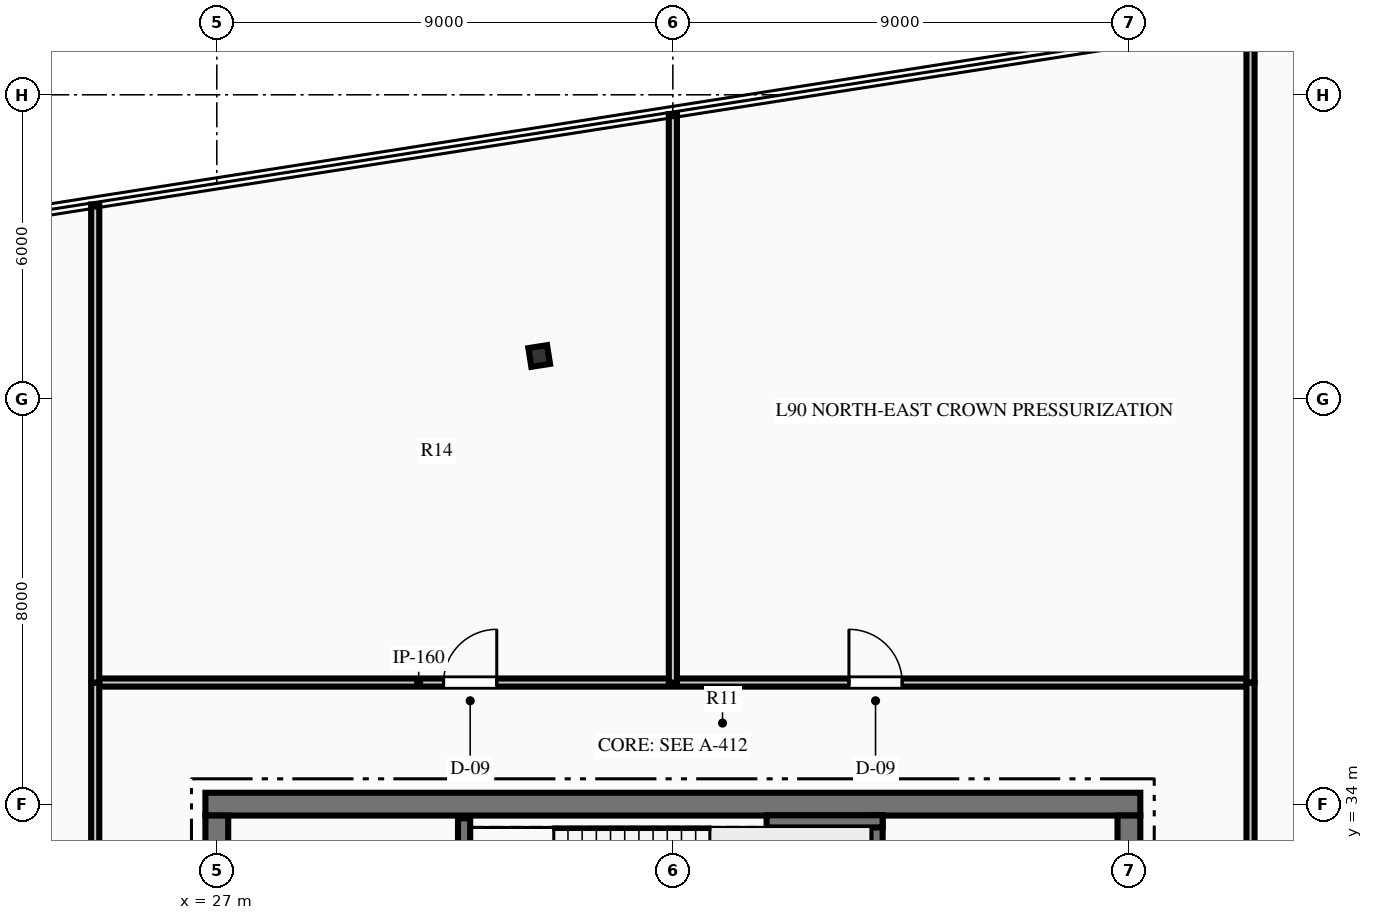
"""IFC4 building model, lengths in metres.
Left out: names, types, materials, properties, quantities, classifications, styles, units other than length and angle.
Written with IfcOpenShell. Run it as: python <this file> out.ifc"""

import sys

from ifc_helpers import new_model, si_unit, direction, frame, frame_2d, origin, origin_2d, place, context, subcontext, project, spatial, rectangle, i_section, extrude, element, fill, save


model = new_model("IFC4")
c1 = context("Model", 3, precision=1e-05, world=origin(), true_north=direction((0.0, 1.0)))
c2 = subcontext(c1, "Body", "Model", "MODEL_VIEW")
j1 = project(units=[si_unit("LENGTHUNIT", "METRE"), si_unit("PLANEANGLEUNIT", "RADIAN")], contexts=[c1])
p1 = place(None, origin())
s1 = spatial("IfcSite", under=j1, at=p1, CompositionType="ELEMENT")
p2 = place(p1, origin())
s2 = spatial("IfcBuilding", under=s1, at=p2, CompositionType="ELEMENT")
p3 = place(p2, frame((0.0, 0.0, 356.4)))
s3 = spatial("IfcBuildingStorey", under=s2, at=p3, CompositionType="ELEMENT", Elevation=356.4)
p4 = place(p3, frame((26.775, 34.0, 0.0), z_axis=(0.0, 0.0, 1.0), x_axis=(1.0, 0.0, 0.0)))
e1 = element("IfcWall", 1, at=p4, inside=s3, PredefinedType="SHEAR", context=c2, shape_type="SweptSolid", body=[
    extrude(rectangle(XDim=18.45, YDim=0.45, at=frame_2d((9.225, 0.0))), origin(), (0.0, 0.0, 1.0), 4.2),
])
p5 = place(p3, frame((27.0, 18.225, 0.0), z_axis=(0.0, 0.0, 1.0), x_axis=(0.0, 1.0, 0.0)))
e2 = element("IfcWall", 2, at=p5, inside=s3, PredefinedType="SHEAR", context=c2, shape_type="SweptSolid", body=[
    extrude(rectangle(XDim=15.55, YDim=0.45, at=frame_2d((7.775, 0.0))), origin(), (0.0, 0.0, 1.0), 4.2),
])
p6 = place(p5, frame((10.015, 0.0, 0.0)))
e3 = element("IfcOpeningElement", 3, at=p6, cuts=e2, PredefinedType="OPENING", context=c2, shape_type="SweptSolid", body=[
    extrude(rectangle(XDim=1.4, YDim=2.2, at=frame_2d((0.7, 1.1))), frame((0.0, 0.235, 0.0), z_axis=(0.0, -1.0, 0.0), x_axis=(1.0, 0.0, 0.0)), (0.0, 0.0, 1.0), 0.47),
])
p7 = place(p3, frame((45.0, 18.225, 0.0), z_axis=(0.0, 0.0, 1.0), x_axis=(0.0, 1.0, 0.0)))
e4 = element("IfcWall", 4, at=p7, inside=s3, PredefinedType="SHEAR", context=c2, shape_type="SweptSolid", body=[
    extrude(rectangle(XDim=15.55, YDim=0.45, at=frame_2d((7.775, 0.0))), origin(), (0.0, 0.0, 1.0), 4.2),
])
p8 = place(p7, frame((10.015, 0.0, 0.0)))
e5 = element("IfcOpeningElement", 5, at=p8, cuts=e4, PredefinedType="OPENING", context=c2, shape_type="SweptSolid", body=[
    extrude(rectangle(XDim=1.4, YDim=2.2, at=frame_2d((0.7, 1.1))), frame((0.0, 0.235, 0.0), z_axis=(0.0, -1.0, 0.0), x_axis=(1.0, 0.0, 0.0)), (0.0, 0.0, 1.0), 0.47),
])
p9 = place(p3, frame((31.88, 29.93, 0.0), z_axis=(0.0, 0.0, 1.0), x_axis=(0.0, 1.0, 0.0)))
e6 = element("IfcWall", 6, at=p9, inside=s3, PredefinedType="SHEAR", context=c2, shape_type="SweptSolid", body=[
    extrude(rectangle(XDim=3.79, YDim=0.24, at=frame_2d((1.895, 0.0))), origin(), (0.0, 0.0, 1.0), 4.2),
])
p10 = place(p3, frame((40.02, 29.93, 0.0), z_axis=(0.0, 0.0, 1.0), x_axis=(0.0, 1.0, 0.0)))
e7 = element("IfcWall", 7, at=p10, inside=s3, PredefinedType="SHEAR", context=c2, shape_type="SweptSolid", body=[
    extrude(rectangle(XDim=3.85, YDim=0.24, at=frame_2d((1.925, 0.0))), origin(), (0.0, 0.0, 1.0), 4.2),
])
p11 = place(p3, frame((37.85, 33.66, 0.0), z_axis=(0.0, 0.0, 1.0), x_axis=(1.0, 0.0, 0.0)))
e8 = element("IfcWall", 8, at=p11, inside=s3, PredefinedType="SHEAR", context=c2, shape_type="SweptSolid", body=[
    extrude(rectangle(XDim=2.29, YDim=0.24, at=frame_2d((1.145, 0.0))), origin(), (0.0, 0.0, 1.0), 4.2),
])
p12 = place(p3, frame((33.362, 42.845, 0.0), z_axis=(0.0, 0.0, 1.0), x_axis=(-0.154710386299, 0.987959865769, 0.0)))
e9 = element("IfcColumn", 9, at=p12, inside=s3, PredefinedType="COLUMN", context=c2, shape_type="SweptSolid", body=[
    extrude(i_section(OverallWidth=0.374, OverallDepth=0.373, WebThickness=0.016, FlangeThickness=0.026, at=origin_2d()), origin(), (0.0, 0.0, 1.0), 4.2),
])
p13 = place(p3, frame((24.6, 36.4, 0.0), z_axis=(0.0, 0.0, 1.0), x_axis=(1.0, 0.0, 0.0)))
e10 = element("IfcWall", 10, at=p13, inside=s3, PredefinedType="PARTITIONING", context=c2, shape_type="SweptSolid", body=[
    extrude(rectangle(XDim=22.8, YDim=0.16, at=frame_2d((11.4, 0.0))), origin(), (0.0, 0.0, 1.0), 3.93),
])
p14 = place(p13, frame((6.875, 0.0, 0.0)))
e11 = element("IfcOpeningElement", 11, at=p14, cuts=e10, PredefinedType="OPENING", context=c2, shape_type="SweptSolid", body=[
    extrude(rectangle(XDim=1.05, YDim=2.15, at=frame_2d((0.525, 1.075))), frame((0.0, 0.09, 0.0), z_axis=(0.0, -1.0, 0.0), x_axis=(1.0, 0.0, 0.0)), (0.0, 0.0, 1.0), 0.18),
])
p15 = place(p13, frame((14.875, 0.0, 0.0)))
e12 = element("IfcOpeningElement", 12, at=p15, cuts=e10, PredefinedType="OPENING", context=c2, shape_type="SweptSolid", body=[
    extrude(rectangle(XDim=1.05, YDim=2.15, at=frame_2d((0.525, 1.075))), frame((0.0, 0.09, 0.0), z_axis=(0.0, -1.0, 0.0), x_axis=(1.0, 0.0, 0.0)), (0.0, 0.0, 1.0), 0.18),
])
p16 = place(p3, frame((24.6, 15.6, 0.0), z_axis=(0.0, 0.0, 1.0), x_axis=(0.0, 1.0, 0.0)))
e13 = element("IfcWall", 13, at=p16, inside=s3, PredefinedType="PARTITIONING", context=c2, shape_type="SweptSolid", body=[
    extrude(rectangle(XDim=20.8, YDim=0.16, at=frame_2d((10.4, 0.0))), origin(), (0.0, 0.0, 1.0), 3.93),
])
p17 = place(p16, frame((7.375, 0.0, 0.0)))
e14 = element("IfcOpeningElement", 14, at=p17, cuts=e13, PredefinedType="OPENING", context=c2, shape_type="SweptSolid", body=[
    extrude(rectangle(XDim=1.05, YDim=2.15, at=frame_2d((0.525, 1.075))), frame((0.0, 0.09, 0.0), z_axis=(0.0, -1.0, 0.0), x_axis=(1.0, 0.0, 0.0)), (0.0, 0.0, 1.0), 0.18),
])
p18 = place(p3, frame((47.4, 15.6, 0.0), z_axis=(0.0, 0.0, 1.0), x_axis=(0.0, 1.0, 0.0)))
e15 = element("IfcWall", 15, at=p18, inside=s3, PredefinedType="PARTITIONING", context=c2, shape_type="SweptSolid", body=[
    extrude(rectangle(XDim=20.8, YDim=0.16, at=frame_2d((10.4, 0.0))), origin(), (0.0, 0.0, 1.0), 3.93),
])
p19 = place(p18, frame((7.375, 0.0, 0.0)))
e16 = element("IfcOpeningElement", 16, at=p19, cuts=e15, PredefinedType="OPENING", context=c2, shape_type="SweptSolid", body=[
    extrude(rectangle(XDim=1.05, YDim=2.15, at=frame_2d((0.525, 1.075))), frame((0.0, 0.09, 0.0), z_axis=(0.0, -1.0, 0.0), x_axis=(1.0, 0.0, 0.0)), (0.0, 0.0, 1.0), 0.18),
])
p20 = place(p3, frame((36.0, 36.4, 0.0), z_axis=(0.0, 0.0, 1.0), x_axis=(0.0, 1.0, 0.0)))
e17 = element("IfcWall", 17, at=p20, inside=s3, PredefinedType="PARTITIONING", context=c2, shape_type="SweptSolid", body=[
    extrude(rectangle(XDim=11.22, YDim=0.16, at=frame_2d((5.61, 0.0))), origin(), (0.0, 0.0, 1.0), 3.93),
])
p21 = place(p3, frame((24.6, 36.4, 0.0), z_axis=(0.0, 0.0, 1.0), x_axis=(0.0, 1.0, 0.0)))
e18 = element("IfcWall", 18, at=p21, inside=s3, PredefinedType="PARTITIONING", context=c2, shape_type="SweptSolid", body=[
    extrude(rectangle(XDim=9.435, YDim=0.16, at=frame_2d((4.718, 0.0))), origin(), (0.0, 0.0, 1.0), 3.93),
])
p22 = place(p3, frame((47.4, 36.4, 0.0), z_axis=(0.0, 0.0, 1.0), x_axis=(0.0, 1.0, 0.0)))
e19 = element("IfcWall", 19, at=p22, inside=s3, PredefinedType="PARTITIONING", context=c2, shape_type="SweptSolid", body=[
    extrude(rectangle(XDim=13.006, YDim=0.16, at=frame_2d((6.503, 0.0))), origin(), (0.0, 0.0, 1.0), 3.93),
])
p23 = place(p14, origin())
e20 = element("IfcDoor", 20, at=p23, inside=s3, OperationType="SINGLE_SWING_RIGHT", PredefinedType="DOOR", context=c2, shape_type="SweptSolid", body=[
    extrude(rectangle(XDim=1.05, YDim=2.15, at=frame_2d((0.525, 1.075))), frame((0.0, 0.025, 0.0), z_axis=(0.0, -1.0, 0.0), x_axis=(1.0, 0.0, 0.0)), (0.0, 0.0, 1.0), 0.05),
])
fill(e11, e20)
p24 = place(p15, origin())
e21 = element("IfcDoor", 21, at=p24, inside=s3, OperationType="SINGLE_SWING_LEFT", PredefinedType="DOOR", context=c2, shape_type="SweptSolid", body=[
    extrude(rectangle(XDim=1.05, YDim=2.15, at=frame_2d((0.525, 1.075))), frame((0.0, 0.025, 0.0), z_axis=(0.0, -1.0, 0.0), x_axis=(1.0, 0.0, 0.0)), (0.0, 0.0, 1.0), 0.05),
])
fill(e12, e21)
save(model, sys.argv[1])
